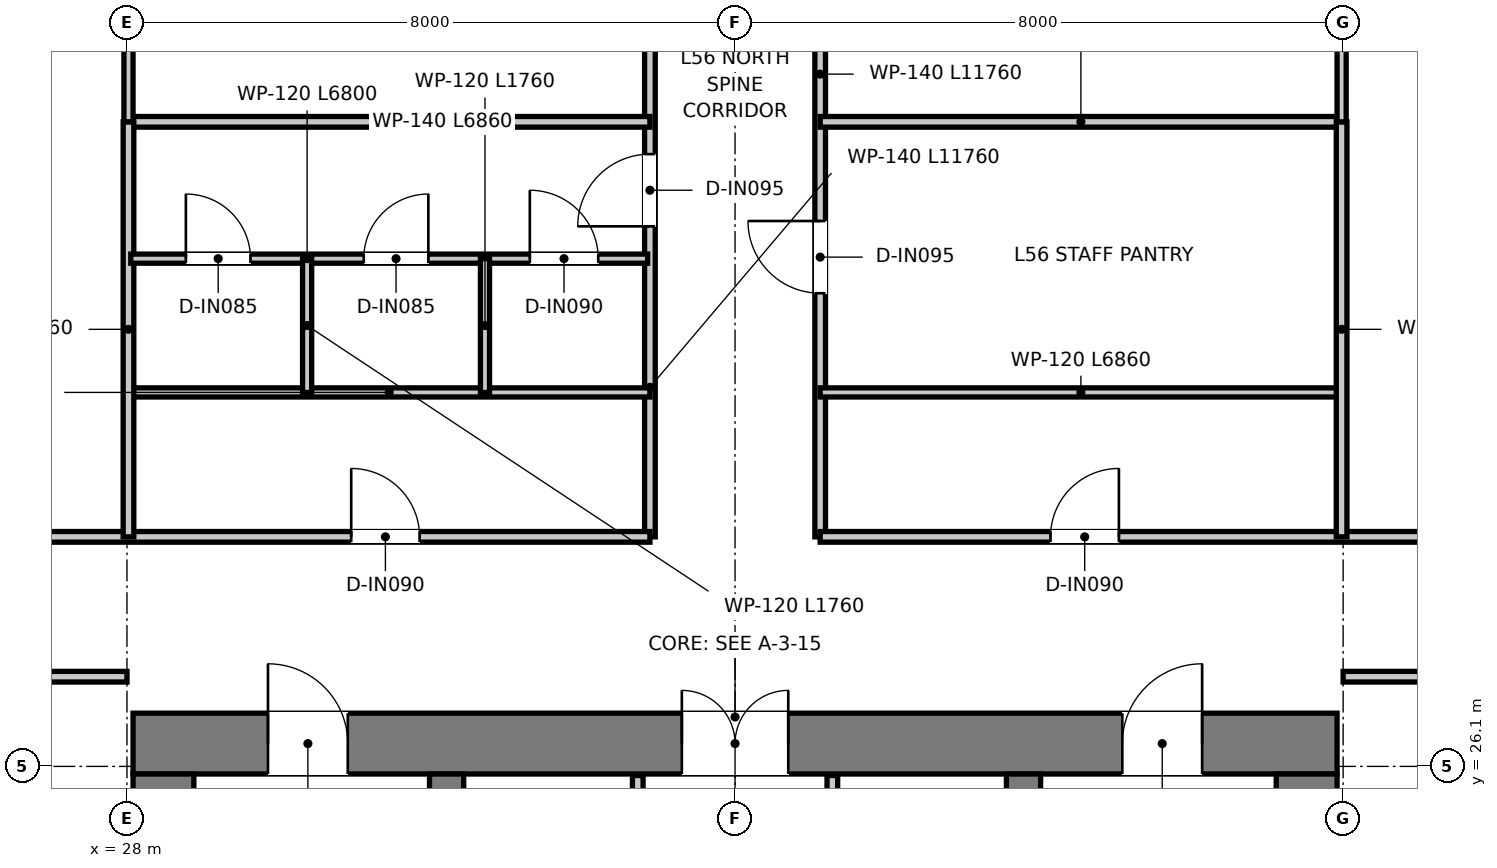
"""IFC4 building model, lengths in metres.
Left out: names, types, materials, properties, quantities, classifications, styles, units other than length and angle.
Written with IfcOpenShell. Run it as: python <this file> out.ifc"""

import sys

from ifc_helpers import new_model, si_unit, direction, frame, frame_2d, origin, place, context, subcontext, project, spatial, rectangle, extrude, element, fill, save


model = new_model("IFC4")
c1 = context("Model", 3, precision=1e-05, world=origin(), true_north=direction((0.0, 1.0)))
c2 = subcontext(c1, "Body", "Model", "MODEL_VIEW")
j1 = project(units=[si_unit("LENGTHUNIT", "METRE"), si_unit("PLANEANGLEUNIT", "RADIAN")], contexts=[c1])
p1 = place(None, origin())
s1 = spatial("IfcSite", under=j1, at=p1, CompositionType="ELEMENT")
p2 = place(p1, origin())
s2 = spatial("IfcBuilding", under=s1, at=p2, CompositionType="ELEMENT")
p3 = place(p2, frame((0.0, 0.0, 231.0)))
s3 = spatial("IfcBuildingStorey", under=s2, at=p3, CompositionType="ELEMENT", Elevation=231.0)
p4 = place(p3, frame((28.08, 26.4, 0.0), z_axis=(0.0, 0.0, 1.0), x_axis=(1.0, 0.0, 0.0)))
e1 = element("IfcWall", 1, at=p4, inside=s3, PredefinedType="SHEAR", context=c2, shape_type="SweptSolid", body=[
    extrude(rectangle(XDim=15.84, YDim=0.8, at=frame_2d((7.92, 0.0))), origin(), (0.0, 0.0, 1.0), 3.95),
])
p5 = place(p4, frame((7.22, 0.0, 0.0)))
e2 = element("IfcOpeningElement", 2, at=p5, cuts=e1, PredefinedType="OPENING", context=c2, shape_type="SweptSolid", body=[
    extrude(rectangle(XDim=1.4, YDim=2.2, at=frame_2d((0.7, 1.1))), frame((0.0, 0.41, 0.0), z_axis=(0.0, -1.0, 0.0), x_axis=(1.0, 0.0, 0.0)), (0.0, 0.0, 1.0), 0.82),
])
p6 = place(p4, frame((1.775, 0.0, 0.0)))
e3 = element("IfcOpeningElement", 3, at=p6, cuts=e1, PredefinedType="OPENING", context=c2, shape_type="SweptSolid", body=[
    extrude(rectangle(XDim=1.05, YDim=2.1, at=frame_2d((0.525, 1.05))), frame((0.0, 0.41, 0.0), z_axis=(0.0, -1.0, 0.0), x_axis=(1.0, 0.0, 0.0)), (0.0, 0.0, 1.0), 0.82),
])
p7 = place(p4, frame((13.015, 0.0, 0.0)))
e4 = element("IfcOpeningElement", 4, at=p7, cuts=e1, PredefinedType="OPENING", context=c2, shape_type="SweptSolid", body=[
    extrude(rectangle(XDim=1.05, YDim=2.1, at=frame_2d((0.525, 1.05))), frame((0.0, 0.41, 0.0), z_axis=(0.0, -1.0, 0.0), x_axis=(1.0, 0.0, 0.0)), (0.0, 0.0, 1.0), 0.82),
])
for number, where, z_axis, x_axis in (
    (5, (28.48, 11.3, 0.0), (0.0, 0.0, 1.0), (0.0, 1.0, 0.0)),
    (6, (43.52, 11.3, 0.0), (0.0, 0.0, 1.0), (0.0, 1.0, 0.0)),
):
    element("IfcWall", number, at=place(p3, frame(where, z_axis=z_axis, x_axis=x_axis)), inside=s3, PredefinedType="SHEAR", context=c2, shape_type="SweptSolid", body=[
        extrude(rectangle(XDim=14.7, YDim=0.8, at=frame_2d((7.35, 0.0))), origin(), (0.0, 0.0, 1.0), 3.95),
    ])
p8 = place(p3, frame((32.205, 13.22, 0.0), z_axis=(0.0, 0.0, 1.0), x_axis=(0.0, 1.0, 0.0)))
e7 = element("IfcWall", 7, at=p8, inside=s3, PredefinedType="SHEAR", context=c2, shape_type="SweptSolid", body=[
    extrude(rectangle(XDim=12.78, YDim=0.45, at=frame_2d((6.39, 0.0))), origin(), (0.0, 0.0, 1.0), 3.95),
])
p9 = place(p8, frame((10.58, 0.0, 0.0)))
e8 = element("IfcOpeningElement", 8, at=p9, cuts=e7, PredefinedType="OPENING", context=c2, shape_type="SweptSolid", body=[
    extrude(rectangle(XDim=1.1, YDim=2.15, at=frame_2d((0.55, 1.075))), frame((0.0, 0.235, 0.0), z_axis=(0.0, -1.0, 0.0), x_axis=(1.0, 0.0, 0.0)), (0.0, 0.0, 1.0), 0.47),
])
p10 = place(p3, frame((39.795, 13.22, 0.0), z_axis=(0.0, 0.0, 1.0), x_axis=(0.0, 1.0, 0.0)))
e9 = element("IfcWall", 9, at=p10, inside=s3, PredefinedType="SHEAR", context=c2, shape_type="SweptSolid", body=[
    extrude(rectangle(XDim=12.78, YDim=0.45, at=frame_2d((6.39, 0.0))), origin(), (0.0, 0.0, 1.0), 3.95),
])
p11 = place(p10, frame((10.58, 0.0, 0.0)))
e10 = element("IfcOpeningElement", 10, at=p11, cuts=e9, PredefinedType="OPENING", context=c2, shape_type="SweptSolid", body=[
    extrude(rectangle(XDim=1.1, YDim=2.15, at=frame_2d((0.55, 1.075))), frame((0.0, 0.235, 0.0), z_axis=(0.0, -1.0, 0.0), x_axis=(1.0, 0.0, 0.0)), (0.0, 0.0, 1.0), 0.47),
])
p12 = place(p3, frame((34.72, 20.2, 0.0), z_axis=(0.0, 0.0, 1.0), x_axis=(0.0, 1.0, 0.0)))
e11 = element("IfcWall", 11, at=p12, inside=s3, PredefinedType="PARTITIONING", context=c2, shape_type="SweptSolid", body=[
    extrude(rectangle(XDim=5.78, YDim=0.14, at=frame_2d((2.89, 0.0))), origin(), (0.0, 0.0, 1.0), 2.67),
])
p13 = place(p12, frame((1.05, 0.0, 0.0)))
e12 = element("IfcOpeningElement", 12, at=p13, cuts=e11, PredefinedType="OPENING", context=c2, shape_type="SweptSolid", body=[
    extrude(rectangle(XDim=0.9, YDim=2.1, at=frame_2d((0.45, 1.05))), frame((0.0, 0.08, 0.0), z_axis=(0.0, -1.0, 0.0), x_axis=(1.0, 0.0, 0.0)), (0.0, 0.0, 1.0), 0.16),
])
p14 = place(p3, frame((37.28, 20.2, 0.0), z_axis=(0.0, 0.0, 1.0), x_axis=(0.0, 1.0, 0.0)))
e13 = element("IfcWall", 13, at=p14, inside=s3, PredefinedType="PARTITIONING", context=c2, shape_type="SweptSolid", body=[
    extrude(rectangle(XDim=5.78, YDim=0.14, at=frame_2d((2.89, 0.0))), origin(), (0.0, 0.0, 1.0), 2.67),
])
p15 = place(p14, frame((0.95, 0.0, 0.0)))
e14 = element("IfcOpeningElement", 14, at=p15, cuts=e13, PredefinedType="OPENING", context=c2, shape_type="SweptSolid", body=[
    extrude(rectangle(XDim=1.1, YDim=2.15, at=frame_2d((0.55, 1.075))), frame((0.0, 0.08, 0.0), z_axis=(0.0, -1.0, 0.0), x_axis=(1.0, 0.0, 0.0)), (0.0, 0.0, 1.0), 0.16),
])
p16 = place(p3, frame((34.88, 29.12, 0.0), z_axis=(0.0, 0.0, 1.0), x_axis=(0.0, 1.0, 0.0)))
e15 = element("IfcWall", 15, at=p16, inside=s3, PredefinedType="PARTITIONING", context=c2, shape_type="SweptSolid", body=[
    extrude(rectangle(XDim=11.76, YDim=0.14, at=frame_2d((5.88, 0.0))), origin(), (0.0, 0.0, 1.0), 3.03),
])
p17 = place(p16, frame((4.085, 0.0, 0.0)))
e16 = element("IfcOpeningElement", 16, at=p17, cuts=e15, PredefinedType="OPENING", context=c2, shape_type="SweptSolid", body=[
    extrude(rectangle(XDim=0.95, YDim=2.1, at=frame_2d((0.475, 1.05))), frame((0.0, 0.08, 0.0), z_axis=(0.0, -1.0, 0.0), x_axis=(1.0, 0.0, 0.0)), (0.0, 0.0, 1.0), 0.16),
])
p18 = place(p16, frame((6.82, 0.0, 0.0)))
e17 = element("IfcOpeningElement", 17, at=p18, cuts=e15, PredefinedType="OPENING", context=c2, shape_type="SweptSolid", body=[
    extrude(rectangle(XDim=0.9, YDim=2.1, at=frame_2d((0.45, 1.05))), frame((0.0, 0.08, 0.0), z_axis=(0.0, -1.0, 0.0), x_axis=(1.0, 0.0, 0.0)), (0.0, 0.0, 1.0), 0.16),
])
p19 = place(p16, frame((9.83, 0.0, 0.0)))
e18 = element("IfcOpeningElement", 18, at=p19, cuts=e15, PredefinedType="OPENING", context=c2, shape_type="SweptSolid", body=[
    extrude(rectangle(XDim=0.9, YDim=2.1, at=frame_2d((0.45, 1.05))), frame((0.0, 0.08, 0.0), z_axis=(0.0, -1.0, 0.0), x_axis=(1.0, 0.0, 0.0)), (0.0, 0.0, 1.0), 0.16),
])
p20 = place(p3, frame((37.12, 29.12, 0.0), z_axis=(0.0, 0.0, 1.0), x_axis=(0.0, 1.0, 0.0)))
e19 = element("IfcWall", 19, at=p20, inside=s3, PredefinedType="PARTITIONING", context=c2, shape_type="SweptSolid", body=[
    extrude(rectangle(XDim=11.76, YDim=0.14, at=frame_2d((5.88, 0.0))), origin(), (0.0, 0.0, 1.0), 3.03),
])
p21 = place(p20, frame((3.205, 0.0, 0.0)))
e20 = element("IfcOpeningElement", 20, at=p21, cuts=e19, PredefinedType="OPENING", context=c2, shape_type="SweptSolid", body=[
    extrude(rectangle(XDim=0.95, YDim=2.1, at=frame_2d((0.475, 1.05))), frame((0.0, 0.08, 0.0), z_axis=(0.0, -1.0, 0.0), x_axis=(1.0, 0.0, 0.0)), (0.0, 0.0, 1.0), 0.16),
])
p22 = place(p20, frame((8.02, 0.0, 0.0)))
e21 = element("IfcOpeningElement", 21, at=p22, cuts=e19, PredefinedType="OPENING", context=c2, shape_type="SweptSolid", body=[
    extrude(rectangle(XDim=0.9, YDim=2.1, at=frame_2d((0.45, 1.05))), frame((0.0, 0.08, 0.0), z_axis=(0.0, -1.0, 0.0), x_axis=(1.0, 0.0, 0.0)), (0.0, 0.0, 1.0), 0.16),
])
p23 = place(p3, frame((11.803, 29.12, 0.0), z_axis=(0.0, 0.0, 1.0), x_axis=(1.0, 0.0, 0.0)))
e22 = element("IfcWall", 22, at=p23, inside=s3, PredefinedType="PARTITIONING", context=c2, shape_type="SweptSolid", body=[
    extrude(rectangle(XDim=23.077, YDim=0.14, at=frame_2d((11.538, 0.0))), origin(), (0.0, 0.0, 1.0), 3.03),
])
p24 = place(p23, frame((19.147, 0.0, 0.0)))
e23 = element("IfcOpeningElement", 23, at=p24, cuts=e22, PredefinedType="OPENING", context=c2, shape_type="SweptSolid", body=[
    extrude(rectangle(XDim=0.9, YDim=2.1, at=frame_2d((0.45, 1.05))), frame((0.0, 0.08, 0.0), z_axis=(0.0, -1.0, 0.0), x_axis=(1.0, 0.0, 0.0)), (0.0, 0.0, 1.0), 0.16),
])
p25 = place(p23, frame((7.363, 0.0, 0.0)))
e24 = element("IfcOpeningElement", 24, at=p25, cuts=e22, PredefinedType="OPENING", context=c2, shape_type="SweptSolid", body=[
    extrude(rectangle(XDim=0.9, YDim=2.1, at=frame_2d((0.45, 1.05))), frame((0.0, 0.08, 0.0), z_axis=(0.0, -1.0, 0.0), x_axis=(1.0, 0.0, 0.0)), (0.0, 0.0, 1.0), 0.16),
])
p26 = place(p3, frame((37.12, 29.12, 0.0), z_axis=(0.0, 0.0, 1.0), x_axis=(1.0, 0.0, 0.0)))
e25 = element("IfcWall", 25, at=p26, inside=s3, PredefinedType="PARTITIONING", context=c2, shape_type="SweptSolid", body=[
    extrude(rectangle(XDim=22.73, YDim=0.14, at=frame_2d((11.365, 0.0))), origin(), (0.0, 0.0, 1.0), 3.03),
])
p27 = place(p26, frame((3.03, 0.0, 0.0)))
e26 = element("IfcOpeningElement", 26, at=p27, cuts=e25, PredefinedType="OPENING", context=c2, shape_type="SweptSolid", body=[
    extrude(rectangle(XDim=0.9, YDim=2.1, at=frame_2d((0.45, 1.05))), frame((0.0, 0.08, 0.0), z_axis=(0.0, -1.0, 0.0), x_axis=(1.0, 0.0, 0.0)), (0.0, 0.0, 1.0), 0.16),
])
p28 = place(p26, frame((14.604, 0.0, 0.0)))
e27 = element("IfcOpeningElement", 27, at=p28, cuts=e25, PredefinedType="OPENING", context=c2, shape_type="SweptSolid", body=[
    extrude(rectangle(XDim=0.9, YDim=2.1, at=frame_2d((0.45, 1.05))), frame((0.0, 0.08, 0.0), z_axis=(0.0, -1.0, 0.0), x_axis=(1.0, 0.0, 0.0)), (0.0, 0.0, 1.0), 0.16),
])
p29 = place(p3, frame((13.667, 27.28, 0.0), z_axis=(0.0, 0.0, 1.0), x_axis=(1.0, 0.0, 0.0)))
e28 = element("IfcWall", 28, at=p29, inside=s3, PredefinedType="PARTITIONING", context=c2, shape_type="SweptSolid", body=[
    extrude(rectangle(XDim=14.333, YDim=0.14, at=frame_2d((7.166, 0.0))), origin(), (0.0, 0.0, 1.0), 3.03),
])
p30 = place(p29, frame((1.198, 0.0, 0.0)))
e29 = element("IfcOpeningElement", 29, at=p30, cuts=e28, PredefinedType="OPENING", context=c2, shape_type="SweptSolid", body=[
    extrude(rectangle(XDim=0.9, YDim=2.1, at=frame_2d((0.45, 1.05))), frame((0.0, 0.08, 0.0), z_axis=(0.0, -1.0, 0.0), x_axis=(1.0, 0.0, 0.0)), (0.0, 0.0, 1.0), 0.16),
])
p31 = place(p29, frame((8.683, 0.0, 0.0)))
e30 = element("IfcOpeningElement", 30, at=p31, cuts=e28, PredefinedType="OPENING", context=c2, shape_type="SweptSolid", body=[
    extrude(rectangle(XDim=0.9, YDim=2.1, at=frame_2d((0.45, 1.05))), frame((0.0, 0.08, 0.0), z_axis=(0.0, -1.0, 0.0), x_axis=(1.0, 0.0, 0.0)), (0.0, 0.0, 1.0), 0.16),
])
p32 = place(p29, frame((11.683, 0.0, 0.0)))
e31 = element("IfcOpeningElement", 31, at=p32, cuts=e28, PredefinedType="OPENING", context=c2, shape_type="SweptSolid", body=[
    extrude(rectangle(XDim=0.9, YDim=2.1, at=frame_2d((0.45, 1.05))), frame((0.0, 0.08, 0.0), z_axis=(0.0, -1.0, 0.0), x_axis=(1.0, 0.0, 0.0)), (0.0, 0.0, 1.0), 0.16),
])
p33 = place(p3, frame((44.0, 27.28, 0.0), z_axis=(0.0, 0.0, 1.0), x_axis=(1.0, 0.0, 0.0)))
e32 = element("IfcWall", 32, at=p33, inside=s3, PredefinedType="PARTITIONING", context=c2, shape_type="SweptSolid", body=[
    extrude(rectangle(XDim=14.035, YDim=0.14, at=frame_2d((7.017, 0.0))), origin(), (0.0, 0.0, 1.0), 3.03),
])
p34 = place(p33, frame((4.75, 0.0, 0.0)))
e33 = element("IfcOpeningElement", 33, at=p34, cuts=e32, PredefinedType="OPENING", context=c2, shape_type="SweptSolid", body=[
    extrude(rectangle(XDim=0.9, YDim=2.1, at=frame_2d((0.45, 1.05))), frame((0.0, 0.08, 0.0), z_axis=(0.0, -1.0, 0.0), x_axis=(1.0, 0.0, 0.0)), (0.0, 0.0, 1.0), 0.16),
])
for number, where, z_axis, x_axis in (
    (34, (28.02, 31.02, 0.0), (0.0, 0.0, 1.0), (1.0, 0.0, 0.0)),
    (35, (37.12, 31.02, 0.0), (0.0, 0.0, 1.0), (1.0, 0.0, 0.0)),
):
    element("IfcWall", number, at=place(p3, frame(where, z_axis=z_axis, x_axis=x_axis)), inside=s3, PredefinedType="PARTITIONING", context=c2, shape_type="SweptSolid", body=[
        extrude(rectangle(XDim=6.86, YDim=0.12, at=frame_2d((3.43, 0.0))), origin(), (0.0, 0.0, 1.0), 3.18),
    ])
for number, where, z_axis, x_axis in (
    (36, (28.02, 34.58, 0.0), (0.0, 0.0, 1.0), (1.0, 0.0, 0.0)),
    (37, (37.12, 34.58, 0.0), (0.0, 0.0, 1.0), (1.0, 0.0, 0.0)),
):
    element("IfcWall", number, at=place(p3, frame(where, z_axis=z_axis, x_axis=x_axis)), inside=s3, PredefinedType="PARTITIONING", context=c2, shape_type="SweptSolid", body=[
        extrude(rectangle(XDim=6.86, YDim=0.14, at=frame_2d((3.43, 0.0))), origin(), (0.0, 0.0, 1.0), 3.18),
    ])
for number, where, z_axis, x_axis in (
    (38, (28.02, 29.12, 0.0), (0.0, 0.0, 1.0), (0.0, 1.0, 0.0)),
    (39, (43.98, 29.12, 0.0), (0.0, 0.0, 1.0), (0.0, 1.0, 0.0)),
):
    element("IfcWall", number, at=place(p3, frame(where, z_axis=z_axis, x_axis=x_axis)), inside=s3, PredefinedType="PARTITIONING", context=c2, shape_type="SweptSolid", body=[
        extrude(rectangle(XDim=5.46, YDim=0.14, at=frame_2d((2.73, 0.0))), origin(), (0.0, 0.0, 1.0), 3.37),
    ])
p35 = place(p3, frame((28.05, 32.78, 0.0), z_axis=(0.0, 0.0, 1.0), x_axis=(1.0, 0.0, 0.0)))
e40 = element("IfcWall", 40, at=p35, inside=s3, PredefinedType="PARTITIONING", context=c2, shape_type="SweptSolid", body=[
    extrude(rectangle(XDim=6.8, YDim=0.12, at=frame_2d((3.4, 0.0))), origin(), (0.0, 0.0, 1.0), 3.18),
])
p36 = place(p35, frame((0.725, 0.0, 0.0)))
e41 = element("IfcOpeningElement", 41, at=p36, cuts=e40, PredefinedType="OPENING", context=c2, shape_type="SweptSolid", body=[
    extrude(rectangle(XDim=0.85, YDim=2.1, at=frame_2d((0.425, 1.05))), frame((0.0, 0.07, 0.0), z_axis=(0.0, -1.0, 0.0), x_axis=(1.0, 0.0, 0.0)), (0.0, 0.0, 1.0), 0.14),
])
p37 = place(p35, frame((3.065, 0.0, 0.0)))
e42 = element("IfcOpeningElement", 42, at=p37, cuts=e40, PredefinedType="OPENING", context=c2, shape_type="SweptSolid", body=[
    extrude(rectangle(XDim=0.85, YDim=2.1, at=frame_2d((0.425, 1.05))), frame((0.0, 0.07, 0.0), z_axis=(0.0, -1.0, 0.0), x_axis=(1.0, 0.0, 0.0)), (0.0, 0.0, 1.0), 0.14),
])
p38 = place(p35, frame((5.25, 0.0, 0.0)))
e43 = element("IfcOpeningElement", 43, at=p38, cuts=e40, PredefinedType="OPENING", context=c2, shape_type="SweptSolid", body=[
    extrude(rectangle(XDim=0.9, YDim=2.1, at=frame_2d((0.45, 1.05))), frame((0.0, 0.07, 0.0), z_axis=(0.0, -1.0, 0.0), x_axis=(1.0, 0.0, 0.0)), (0.0, 0.0, 1.0), 0.14),
])
p39 = place(p3, frame((30.37, 31.02, 0.0), z_axis=(0.0, 0.0, 1.0), x_axis=(0.0, 1.0, 0.0)))
e44 = element("IfcWall", 44, at=p39, inside=s3, PredefinedType="PARTITIONING", context=c2, shape_type="SweptSolid", body=[
    extrude(rectangle(XDim=1.76, YDim=0.12, at=frame_2d((0.88, 0.0))), origin(), (0.0, 0.0, 1.0), 3.18),
])
p40 = place(p3, frame((32.71, 31.02, 0.0), z_axis=(0.0, 0.0, 1.0), x_axis=(0.0, 1.0, 0.0)))
e45 = element("IfcWall", 45, at=p40, inside=s3, PredefinedType="PARTITIONING", context=c2, shape_type="SweptSolid", body=[
    extrude(rectangle(XDim=1.76, YDim=0.12, at=frame_2d((0.88, 0.0))), origin(), (0.0, 0.0, 1.0), 3.67),
])
p41 = place(p3, frame((28.02, 34.58, 0.0), z_axis=(0.0, 0.0, 1.0), x_axis=(0.0, 1.0, 0.0)))
e46 = element("IfcWall", 46, at=p41, inside=s3, PredefinedType="PARTITIONING", context=c2, shape_type="SweptSolid", body=[
    extrude(rectangle(XDim=13.09, YDim=0.12, at=frame_2d((6.545, 0.0))), origin(), (0.0, 0.0, 1.0), 3.03),
])
p42 = place(p3, frame((43.98, 34.58, 0.0), z_axis=(0.0, 0.0, 1.0), x_axis=(0.0, 1.0, 0.0)))
e47 = element("IfcWall", 47, at=p42, inside=s3, PredefinedType="PARTITIONING", context=c2, shape_type="SweptSolid", body=[
    extrude(rectangle(XDim=12.921, YDim=0.12, at=frame_2d((6.46, 0.0))), origin(), (0.0, 0.0, 1.0), 3.03),
])
p43 = place(p5, origin())
e48 = element("IfcDoor", 48, at=p43, inside=s3, OperationType="DOUBLE_DOOR_SINGLE_SWING", PredefinedType="DOOR", context=c2, shape_type="SweptSolid", body=[
    extrude(rectangle(XDim=1.4, YDim=2.2, at=frame_2d((0.7, 1.1))), frame((0.0, 0.025, 0.0), z_axis=(0.0, -1.0, 0.0), x_axis=(1.0, 0.0, 0.0)), (0.0, 0.0, 1.0), 0.05),
])
fill(e2, e48)
p44 = place(p6, origin())
e49 = element("IfcDoor", 49, at=p44, inside=s3, OperationType="SINGLE_SWING_LEFT", PredefinedType="DOOR", context=c2, shape_type="SweptSolid", body=[
    extrude(rectangle(XDim=1.05, YDim=2.1, at=frame_2d((0.525, 1.05))), frame((0.0, 0.025, 0.0), z_axis=(0.0, -1.0, 0.0), x_axis=(1.0, 0.0, 0.0)), (0.0, 0.0, 1.0), 0.05),
])
fill(e3, e49)
p45 = place(p7, origin())
e50 = element("IfcDoor", 50, at=p45, inside=s3, OperationType="SINGLE_SWING_RIGHT", PredefinedType="DOOR", context=c2, shape_type="SweptSolid", body=[
    extrude(rectangle(XDim=1.05, YDim=2.1, at=frame_2d((0.525, 1.05))), frame((0.0, 0.025, 0.0), z_axis=(0.0, -1.0, 0.0), x_axis=(1.0, 0.0, 0.0)), (0.0, 0.0, 1.0), 0.05),
])
fill(e4, e50)
p46 = place(p24, origin())
e51 = element("IfcDoor", 51, at=p46, inside=s3, OperationType="SINGLE_SWING_LEFT", PredefinedType="DOOR", context=c2, shape_type="SweptSolid", body=[
    extrude(rectangle(XDim=0.9, YDim=2.1, at=frame_2d((0.45, 1.05))), frame((0.0, 0.025, 0.0), z_axis=(0.0, -1.0, 0.0), x_axis=(1.0, 0.0, 0.0)), (0.0, 0.0, 1.0), 0.05),
])
fill(e23, e51)
p47 = place(p27, origin())
e52 = element("IfcDoor", 52, at=p47, inside=s3, OperationType="SINGLE_SWING_RIGHT", PredefinedType="DOOR", context=c2, shape_type="SweptSolid", body=[
    extrude(rectangle(XDim=0.9, YDim=2.1, at=frame_2d((0.45, 1.05))), frame((0.0, 0.025, 0.0), z_axis=(0.0, -1.0, 0.0), x_axis=(1.0, 0.0, 0.0)), (0.0, 0.0, 1.0), 0.05),
])
fill(e26, e52)
p48 = place(p17, origin())
e53 = element("IfcDoor", 53, at=p48, inside=s3, OperationType="SINGLE_SWING_LEFT", PredefinedType="DOOR", context=c2, shape_type="SweptSolid", body=[
    extrude(rectangle(XDim=0.95, YDim=2.1, at=frame_2d((0.475, 1.05))), frame((0.0, 0.025, 0.0), z_axis=(0.0, -1.0, 0.0), x_axis=(1.0, 0.0, 0.0)), (0.0, 0.0, 1.0), 0.05),
])
fill(e16, e53)
p49 = place(p21, origin())
e54 = element("IfcDoor", 54, at=p49, inside=s3, OperationType="SINGLE_SWING_RIGHT", PredefinedType="DOOR", context=c2, shape_type="SweptSolid", body=[
    extrude(rectangle(XDim=0.95, YDim=2.1, at=frame_2d((0.475, 1.05))), frame((0.0, 0.025, 0.0), z_axis=(0.0, -1.0, 0.0), x_axis=(1.0, 0.0, 0.0)), (0.0, 0.0, 1.0), 0.05),
])
fill(e20, e54)
p50 = place(p36, origin())
e55 = element("IfcDoor", 55, at=p50, inside=s3, OperationType="SINGLE_SWING_LEFT", PredefinedType="DOOR", context=c2, shape_type="SweptSolid", body=[
    extrude(rectangle(XDim=0.85, YDim=2.1, at=frame_2d((0.425, 1.05))), frame((0.0, 0.025, 0.0), z_axis=(0.0, -1.0, 0.0), x_axis=(1.0, 0.0, 0.0)), (0.0, 0.0, 1.0), 0.05),
])
fill(e41, e55)
p51 = place(p37, origin())
e56 = element("IfcDoor", 56, at=p51, inside=s3, OperationType="SINGLE_SWING_RIGHT", PredefinedType="DOOR", context=c2, shape_type="SweptSolid", body=[
    extrude(rectangle(XDim=0.85, YDim=2.1, at=frame_2d((0.425, 1.05))), frame((0.0, 0.025, 0.0), z_axis=(0.0, -1.0, 0.0), x_axis=(1.0, 0.0, 0.0)), (0.0, 0.0, 1.0), 0.05),
])
fill(e42, e56)
p52 = place(p38, origin())
e57 = element("IfcDoor", 57, at=p52, inside=s3, OperationType="SINGLE_SWING_LEFT", PredefinedType="DOOR", context=c2, shape_type="SweptSolid", body=[
    extrude(rectangle(XDim=0.9, YDim=2.1, at=frame_2d((0.45, 1.05))), frame((0.0, 0.025, 0.0), z_axis=(0.0, -1.0, 0.0), x_axis=(1.0, 0.0, 0.0)), (0.0, 0.0, 1.0), 0.05),
])
fill(e43, e57)
save(model, sys.argv[1])
